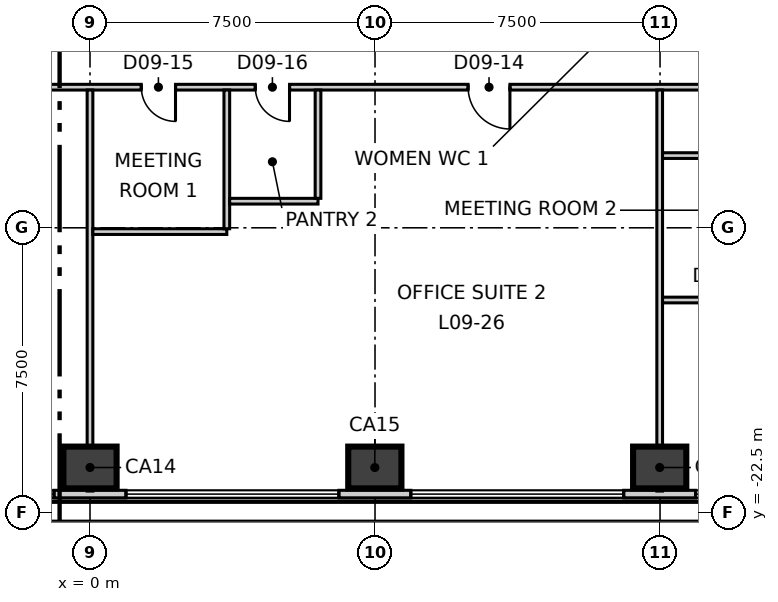
"""IFC4 building model, lengths in metres.
Left out: names, types, materials, properties, quantities, classifications, styles, units other than length and angle.
Written with IfcOpenShell. Run it as: python <this file> out.ifc"""

import sys

from ifc_helpers import new_model, si_unit, direction, frame, frame_2d, origin, origin_2d, place, context, subcontext, project, spatial, rectangle, extrude, element, fill, save


model = new_model("IFC4")
c1 = context("Model", 3, precision=1e-05, world=origin(), true_north=direction((0.0, 1.0)))
c2 = subcontext(c1, "Body", "Model", "MODEL_VIEW")
j1 = project(units=[si_unit("LENGTHUNIT", "METRE"), si_unit("PLANEANGLEUNIT", "RADIAN")], contexts=[c1])
p1 = place(None, origin())
s1 = spatial("IfcSite", under=j1, at=p1, CompositionType="ELEMENT")
p2 = place(p1, origin())
s2 = spatial("IfcBuilding", under=s1, at=p2, CompositionType="ELEMENT")
p3 = place(p2, frame((0.0, 0.0, 47.3)))
s3 = spatial("IfcBuildingStorey", under=s2, at=p3, CompositionType="ELEMENT", Elevation=47.3)
for number, where, z_axis, x_axis in (
    (1, (0.0, -21.307, -0.3), (0.0, 0.0, 1.0), (1.0, 0.0, 0.0)),
    (2, (7.495, -21.307, -0.3), (0.0, 0.0, 1.0), (1.0, 0.0, 0.0)),
    (3, (14.991, -21.307, -0.3), (0.0, 0.0, 1.0), (1.0, 0.0, 0.0)),
):
    element("IfcColumn", number, at=place(p3, frame(where, z_axis=z_axis, x_axis=x_axis)), inside=s3, PredefinedType="COLUMN", context=c2, shape_type="SweptSolid", body=[
        extrude(rectangle(XDim=1.4, YDim=1.1, at=origin_2d()), origin(), (0.0, 0.0, 1.0), 4.0),
    ])
p4 = place(p3, frame((-31.284, -22.007, 0.0), z_axis=(0.0, 0.0, 1.0), x_axis=(1.0, 0.0, 0.0)))
e4 = element("IfcWall", 4, at=p4, inside=s3, PredefinedType="ELEMENTEDWALL", context=c2, shape_type="SweptSolid", body=[
    extrude(rectangle(XDim=62.548, YDim=0.2, at=frame_2d((31.274, 0.0))), origin(), (0.0, 0.0, 1.0), 3.7),
])
p5 = place(p4, frame((2.251, 0.0, 0.9)))
e5 = element("IfcOpeningElement", 5, at=p5, cuts=e4, PredefinedType="OPENING", context=c2, shape_type="SweptSolid", body=[
    extrude(rectangle(XDim=5.6, YDim=2.5, at=frame_2d((2.8, 1.25))), frame((0.0, 0.11, 0.0), z_axis=(0.0, -1.0, 0.0), x_axis=(1.0, 0.0, 0.0)), (0.0, 0.0, 1.0), 0.22),
])
p6 = place(p4, frame((9.746, 0.0, 0.9)))
e6 = element("IfcOpeningElement", 6, at=p6, cuts=e4, PredefinedType="OPENING", context=c2, shape_type="SweptSolid", body=[
    extrude(rectangle(XDim=5.6, YDim=2.5, at=frame_2d((2.8, 1.25))), frame((0.0, 0.11, 0.0), z_axis=(0.0, -1.0, 0.0), x_axis=(1.0, 0.0, 0.0)), (0.0, 0.0, 1.0), 0.22),
])
p7 = place(p4, frame((17.241, 0.0, 0.9)))
e7 = element("IfcOpeningElement", 7, at=p7, cuts=e4, PredefinedType="OPENING", context=c2, shape_type="SweptSolid", body=[
    extrude(rectangle(XDim=5.6, YDim=2.5, at=frame_2d((2.8, 1.25))), frame((0.0, 0.11, 0.0), z_axis=(0.0, -1.0, 0.0), x_axis=(1.0, 0.0, 0.0)), (0.0, 0.0, 1.0), 0.22),
])
p8 = place(p4, frame((24.736, 0.0, 0.9)))
e8 = element("IfcOpeningElement", 8, at=p8, cuts=e4, PredefinedType="OPENING", context=c2, shape_type="SweptSolid", body=[
    extrude(rectangle(XDim=5.6, YDim=2.5, at=frame_2d((2.8, 1.25))), frame((0.0, 0.11, 0.0), z_axis=(0.0, -1.0, 0.0), x_axis=(1.0, 0.0, 0.0)), (0.0, 0.0, 1.0), 0.22),
])
p9 = place(p4, frame((32.232, 0.0, 0.9)))
e9 = element("IfcOpeningElement", 9, at=p9, cuts=e4, PredefinedType="OPENING", context=c2, shape_type="SweptSolid", body=[
    extrude(rectangle(XDim=5.6, YDim=2.5, at=frame_2d((2.8, 1.25))), frame((0.0, 0.11, 0.0), z_axis=(0.0, -1.0, 0.0), x_axis=(1.0, 0.0, 0.0)), (0.0, 0.0, 1.0), 0.22),
])
p10 = place(p4, frame((39.727, 0.0, 0.9)))
e10 = element("IfcOpeningElement", 10, at=p10, cuts=e4, PredefinedType="OPENING", context=c2, shape_type="SweptSolid", body=[
    extrude(rectangle(XDim=5.6, YDim=2.5, at=frame_2d((2.8, 1.25))), frame((0.0, 0.11, 0.0), z_axis=(0.0, -1.0, 0.0), x_axis=(1.0, 0.0, 0.0)), (0.0, 0.0, 1.0), 0.22),
])
p11 = place(p4, frame((47.222, 0.0, 0.9)))
e11 = element("IfcOpeningElement", 11, at=p11, cuts=e4, PredefinedType="OPENING", context=c2, shape_type="SweptSolid", body=[
    extrude(rectangle(XDim=5.6, YDim=2.5, at=frame_2d((2.8, 1.25))), frame((0.0, 0.11, 0.0), z_axis=(0.0, -1.0, 0.0), x_axis=(1.0, 0.0, 0.0)), (0.0, 0.0, 1.0), 0.22),
])
p12 = place(p4, frame((54.717, 0.0, 0.9)))
e12 = element("IfcOpeningElement", 12, at=p12, cuts=e4, PredefinedType="OPENING", context=c2, shape_type="SweptSolid", body=[
    extrude(rectangle(XDim=5.6, YDim=2.5, at=frame_2d((2.8, 1.25))), frame((0.0, 0.11, 0.0), z_axis=(0.0, -1.0, 0.0), x_axis=(1.0, 0.0, 0.0)), (0.0, 0.0, 1.0), 0.22),
])
p13 = place(p3, frame((34.701, -16.089, 0.0), z_axis=(0.0, 0.0, 1.0), x_axis=(-0.499998722828, 0.866026141159, 0.0)))
e13 = element("IfcWall", 13, at=p13, inside=s3, PredefinedType="ELEMENTEDWALL", context=c2, shape_type="SweptSolid", body=[
    extrude(rectangle(XDim=62.548, YDim=0.2, at=frame_2d((31.274, 0.0))), origin(), (0.0, 0.0, 1.0), 3.7),
])
p14 = place(p13, frame((2.25, 0.0, 0.9)))
e14 = element("IfcOpeningElement", 14, at=p14, cuts=e13, PredefinedType="OPENING", context=c2, shape_type="SweptSolid", body=[
    extrude(rectangle(XDim=5.6, YDim=2.5, at=frame_2d((2.8, 1.25))), frame((0.0, 0.11, 0.0), z_axis=(0.0, -1.0, 0.0), x_axis=(1.0, 0.0, 0.0)), (0.0, 0.0, 1.0), 0.22),
])
p15 = place(p13, frame((9.746, 0.0, 0.9)))
e15 = element("IfcOpeningElement", 15, at=p15, cuts=e13, PredefinedType="OPENING", context=c2, shape_type="SweptSolid", body=[
    extrude(rectangle(XDim=5.6, YDim=2.5, at=frame_2d((2.8, 1.25))), frame((0.0, 0.11, 0.0), z_axis=(0.0, -1.0, 0.0), x_axis=(1.0, 0.0, 0.0)), (0.0, 0.0, 1.0), 0.22),
])
p16 = place(p13, frame((17.241, 0.0, 0.9)))
e16 = element("IfcOpeningElement", 16, at=p16, cuts=e13, PredefinedType="OPENING", context=c2, shape_type="SweptSolid", body=[
    extrude(rectangle(XDim=5.6, YDim=2.5, at=frame_2d((2.8, 1.25))), frame((0.0, 0.11, 0.0), z_axis=(0.0, -1.0, 0.0), x_axis=(1.0, 0.0, 0.0)), (0.0, 0.0, 1.0), 0.22),
])
p17 = place(p13, frame((24.736, 0.0, 0.9)))
e17 = element("IfcOpeningElement", 17, at=p17, cuts=e13, PredefinedType="OPENING", context=c2, shape_type="SweptSolid", body=[
    extrude(rectangle(XDim=5.6, YDim=2.5, at=frame_2d((2.8, 1.25))), frame((0.0, 0.11, 0.0), z_axis=(0.0, -1.0, 0.0), x_axis=(1.0, 0.0, 0.0)), (0.0, 0.0, 1.0), 0.22),
])
p18 = place(p13, frame((32.232, 0.0, 0.9)))
e18 = element("IfcOpeningElement", 18, at=p18, cuts=e13, PredefinedType="OPENING", context=c2, shape_type="SweptSolid", body=[
    extrude(rectangle(XDim=5.6, YDim=2.5, at=frame_2d((2.8, 1.25))), frame((0.0, 0.11, 0.0), z_axis=(0.0, -1.0, 0.0), x_axis=(1.0, 0.0, 0.0)), (0.0, 0.0, 1.0), 0.22),
])
p19 = place(p13, frame((39.727, 0.0, 0.9)))
e19 = element("IfcOpeningElement", 19, at=p19, cuts=e13, PredefinedType="OPENING", context=c2, shape_type="SweptSolid", body=[
    extrude(rectangle(XDim=5.6, YDim=2.5, at=frame_2d((2.8, 1.25))), frame((0.0, 0.11, 0.0), z_axis=(0.0, -1.0, 0.0), x_axis=(1.0, 0.0, 0.0)), (0.0, 0.0, 1.0), 0.22),
])
p20 = place(p13, frame((47.222, 0.0, 0.9)))
e20 = element("IfcOpeningElement", 20, at=p20, cuts=e13, PredefinedType="OPENING", context=c2, shape_type="SweptSolid", body=[
    extrude(rectangle(XDim=5.6, YDim=2.5, at=frame_2d((2.8, 1.25))), frame((0.0, 0.11, 0.0), z_axis=(0.0, -1.0, 0.0), x_axis=(1.0, 0.0, 0.0)), (0.0, 0.0, 1.0), 0.22),
])
p21 = place(p13, frame((54.717, 0.0, 0.9)))
e21 = element("IfcOpeningElement", 21, at=p21, cuts=e13, PredefinedType="OPENING", context=c2, shape_type="SweptSolid", body=[
    extrude(rectangle(XDim=5.6, YDim=2.5, at=frame_2d((2.8, 1.25))), frame((0.0, 0.11, 0.0), z_axis=(0.0, -1.0, 0.0), x_axis=(1.0, 0.0, 0.0)), (0.0, 0.0, 1.0), 0.22),
])
p22 = place(p3, frame((-19.497, -11.17, 0.0), z_axis=(0.0, 0.0, 1.0), x_axis=(0.499998854553, 0.866026065108, 0.0)))
e22 = element("IfcWall", 22, at=p22, inside=s3, PredefinedType="PARTITIONING", context=c2, shape_type="SweptSolid", body=[
    extrude(rectangle(XDim=38.994, YDim=0.15, at=frame_2d((19.497, 0.0))), origin(), (0.0, 0.0, 1.0), 3.7),
])
p23 = place(p22, frame((36.144, 0.0, 0.0)))
e23 = element("IfcOpeningElement", 23, at=p23, cuts=e22, PredefinedType="OPENING", context=c2, shape_type="SweptSolid", body=[
    extrude(rectangle(XDim=1.1, YDim=2.1, at=frame_2d((0.55, 1.05))), frame((0.0, 0.085, 0.0), z_axis=(0.0, -1.0, 0.0), x_axis=(1.0, 0.0, 0.0)), (0.0, 0.0, 1.0), 0.17),
])
p24 = place(p22, frame((21.963, 0.0, 0.0)))
e24 = element("IfcOpeningElement", 24, at=p24, cuts=e22, PredefinedType="OPENING", context=c2, shape_type="SweptSolid", body=[
    extrude(rectangle(XDim=1.1, YDim=2.1, at=frame_2d((0.55, 1.05))), frame((0.0, 0.085, 0.0), z_axis=(0.0, -1.0, 0.0), x_axis=(1.0, 0.0, 0.0)), (0.0, 0.0, 1.0), 0.17),
])
p25 = place(p22, frame((32.363, 0.0, 0.0)))
e25 = element("IfcOpeningElement", 25, at=p25, cuts=e22, PredefinedType="OPENING", context=c2, shape_type="SweptSolid", body=[
    extrude(rectangle(XDim=0.9, YDim=2.1, at=frame_2d((0.45, 1.05))), frame((0.0, 0.085, 0.0), z_axis=(0.0, -1.0, 0.0), x_axis=(1.0, 0.0, 0.0)), (0.0, 0.0, 1.0), 0.17),
])
p26 = place(p22, frame((29.163, 0.0, 0.0)))
e26 = element("IfcOpeningElement", 26, at=p26, cuts=e22, PredefinedType="OPENING", context=c2, shape_type="SweptSolid", body=[
    extrude(rectangle(XDim=0.9, YDim=2.1, at=frame_2d((0.45, 1.05))), frame((0.0, 0.085, 0.0), z_axis=(0.0, -1.0, 0.0), x_axis=(1.0, 0.0, 0.0)), (0.0, 0.0, 1.0), 0.17),
])
p27 = place(p22, frame((26.263, 0.0, 0.0)))
e27 = element("IfcOpeningElement", 27, at=p27, cuts=e22, PredefinedType="OPENING", context=c2, shape_type="SweptSolid", body=[
    extrude(rectangle(XDim=1.0, YDim=2.1, at=frame_2d((0.5, 1.05))), frame((0.0, 0.085, 0.0), z_axis=(0.0, -1.0, 0.0), x_axis=(1.0, 0.0, 0.0)), (0.0, 0.0, 1.0), 0.17),
])
p28 = place(p22, frame((11.373, 0.0, 0.0)))
e28 = element("IfcOpeningElement", 28, at=p28, cuts=e22, PredefinedType="OPENING", context=c2, shape_type="SweptSolid", body=[
    extrude(rectangle(XDim=1.1, YDim=2.1, at=frame_2d((0.55, 1.05))), frame((0.0, 0.085, 0.0), z_axis=(0.0, -1.0, 0.0), x_axis=(1.0, 0.0, 0.0)), (0.0, 0.0, 1.0), 0.17),
])
p29 = place(p22, frame((1.581, 0.0, 0.0)))
e29 = element("IfcOpeningElement", 29, at=p29, cuts=e22, PredefinedType="OPENING", context=c2, shape_type="SweptSolid", body=[
    extrude(rectangle(XDim=1.1, YDim=2.1, at=frame_2d((0.55, 1.05))), frame((0.0, 0.085, 0.0), z_axis=(0.0, -1.0, 0.0), x_axis=(1.0, 0.0, 0.0)), (0.0, 0.0, 1.0), 0.17),
])
p30 = place(p3, frame((-19.422, -11.3, 0.0), z_axis=(0.0, 0.0, 1.0), x_axis=(1.0, 0.0, 0.0)))
e30 = element("IfcWall", 30, at=p30, inside=s3, PredefinedType="PARTITIONING", context=c2, shape_type="SweptSolid", body=[
    extrude(rectangle(XDim=38.994, YDim=0.15, at=frame_2d((19.497, 0.0))), origin(), (0.0, 0.0, 1.0), 3.7),
])
p31 = place(p30, frame((1.6, 0.0, 0.0)))
e31 = element("IfcOpeningElement", 31, at=p31, cuts=e30, PredefinedType="OPENING", context=c2, shape_type="SweptSolid", body=[
    extrude(rectangle(XDim=1.1, YDim=2.1, at=frame_2d((0.55, 1.05))), frame((0.0, 0.085, 0.0), z_axis=(0.0, -1.0, 0.0), x_axis=(1.0, 0.0, 0.0)), (0.0, 0.0, 1.0), 0.17),
])
p32 = place(p30, frame((7.682, 0.0, 0.0)))
e32 = element("IfcOpeningElement", 32, at=p32, cuts=e30, PredefinedType="OPENING", context=c2, shape_type="SweptSolid", body=[
    extrude(rectangle(XDim=1.0, YDim=2.1, at=frame_2d((0.5, 1.05))), frame((0.0, 0.085, 0.0), z_axis=(0.0, -1.0, 0.0), x_axis=(1.0, 0.0, 0.0)), (0.0, 0.0, 1.0), 0.17),
])
p33 = place(p30, frame((15.177, 0.0, 0.0)))
e33 = element("IfcOpeningElement", 33, at=p33, cuts=e30, PredefinedType="OPENING", context=c2, shape_type="SweptSolid", body=[
    extrude(rectangle(XDim=1.0, YDim=2.1, at=frame_2d((0.5, 1.05))), frame((0.0, 0.085, 0.0), z_axis=(0.0, -1.0, 0.0), x_axis=(1.0, 0.0, 0.0)), (0.0, 0.0, 1.0), 0.17),
])
p34 = place(p30, frame((29.372, 0.0, 0.0)))
e34 = element("IfcOpeningElement", 34, at=p34, cuts=e30, PredefinedType="OPENING", context=c2, shape_type="SweptSolid", body=[
    extrude(rectangle(XDim=1.1, YDim=2.1, at=frame_2d((0.55, 1.05))), frame((0.0, 0.085, 0.0), z_axis=(0.0, -1.0, 0.0), x_axis=(1.0, 0.0, 0.0)), (0.0, 0.0, 1.0), 0.17),
])
p35 = place(p30, frame((20.772, 0.0, 0.0)))
e35 = element("IfcOpeningElement", 35, at=p35, cuts=e30, PredefinedType="OPENING", context=c2, shape_type="SweptSolid", body=[
    extrude(rectangle(XDim=0.9, YDim=2.1, at=frame_2d((0.45, 1.05))), frame((0.0, 0.085, 0.0), z_axis=(0.0, -1.0, 0.0), x_axis=(1.0, 0.0, 0.0)), (0.0, 0.0, 1.0), 0.17),
])
p36 = place(p30, frame((23.772, 0.0, 0.0)))
e36 = element("IfcOpeningElement", 36, at=p36, cuts=e30, PredefinedType="OPENING", context=c2, shape_type="SweptSolid", body=[
    extrude(rectangle(XDim=0.9, YDim=2.1, at=frame_2d((0.45, 1.05))), frame((0.0, 0.085, 0.0), z_axis=(0.0, -1.0, 0.0), x_axis=(1.0, 0.0, 0.0)), (0.0, 0.0, 1.0), 0.17),
])
p37 = place(p30, frame((36.163, 0.0, 0.0)))
e37 = element("IfcOpeningElement", 37, at=p37, cuts=e30, PredefinedType="OPENING", context=c2, shape_type="SweptSolid", body=[
    extrude(rectangle(XDim=1.1, YDim=2.1, at=frame_2d((0.55, 1.05))), frame((0.0, 0.085, 0.0), z_axis=(0.0, -1.0, 0.0), x_axis=(1.0, 0.0, 0.0)), (0.0, 0.0, 1.0), 0.17),
])
p38 = place(p3, frame((0.0, -21.927, 0.0), z_axis=(0.0, 0.0, 1.0), x_axis=(0.0, 1.0, 0.0)))
e38 = element("IfcWall", 38, at=p38, inside=s3, PredefinedType="PARTITIONING", context=c2, shape_type="SweptSolid", body=[
    extrude(rectangle(XDim=10.552, YDim=0.15, at=frame_2d((5.276, 0.0))), origin(), (0.0, 0.0, 1.0), 3.2),
])
p39 = place(p3, frame((0.075, -15.1, 0.0), z_axis=(0.0, 0.0, 1.0), x_axis=(1.0, 0.0, 0.0)))
e39 = element("IfcWall", 39, at=p39, inside=s3, PredefinedType="PARTITIONING", context=c2, shape_type="SweptSolid", body=[
    extrude(rectangle(XDim=3.525, YDim=0.15, at=frame_2d((1.763, 0.0))), origin(), (0.0, 0.0, 1.0), 3.7),
])
p40 = place(p3, frame((3.6, -15.025, 0.0), z_axis=(0.0, 0.0, 1.0), x_axis=(0.0, 1.0, 0.0)))
e40 = element("IfcWall", 40, at=p40, inside=s3, PredefinedType="PARTITIONING", context=c2, shape_type="SweptSolid", body=[
    extrude(rectangle(XDim=3.65, YDim=0.15, at=frame_2d((1.825, 0.0))), origin(), (0.0, 0.0, 1.0), 3.7),
])
p41 = place(p3, frame((0.075, 22.47, 0.0), z_axis=(0.0, 0.0, 1.0), x_axis=(0.500002280369, -0.866024087209, 0.0)))
e41 = element("IfcWall", 41, at=p41, inside=s3, PredefinedType="PARTITIONING", context=c2, shape_type="SweptSolid", body=[
    extrude(rectangle(XDim=38.844, YDim=0.15, at=frame_2d((19.422, 0.0))), origin(), (0.0, 0.0, 1.0), 3.7),
])
p42 = place(p41, frame((36.244, 0.0, 0.0)))
e42 = element("IfcOpeningElement", 42, at=p42, cuts=e41, PredefinedType="OPENING", context=c2, shape_type="SweptSolid", body=[
    extrude(rectangle(XDim=1.0, YDim=2.1, at=frame_2d((0.5, 1.05))), frame((0.0, 0.085, 0.0), z_axis=(0.0, -1.0, 0.0), x_axis=(1.0, 0.0, 0.0)), (0.0, 0.0, 1.0), 0.17),
])
p43 = place(p41, frame((21.963, 0.0, 0.0)))
e43 = element("IfcOpeningElement", 43, at=p43, cuts=e41, PredefinedType="OPENING", context=c2, shape_type="SweptSolid", body=[
    extrude(rectangle(XDim=1.1, YDim=2.1, at=frame_2d((0.55, 1.05))), frame((0.0, 0.085, 0.0), z_axis=(0.0, -1.0, 0.0), x_axis=(1.0, 0.0, 0.0)), (0.0, 0.0, 1.0), 0.17),
])
p44 = place(p41, frame((32.363, 0.0, 0.0)))
e44 = element("IfcOpeningElement", 44, at=p44, cuts=e41, PredefinedType="OPENING", context=c2, shape_type="SweptSolid", body=[
    extrude(rectangle(XDim=0.9, YDim=2.1, at=frame_2d((0.45, 1.05))), frame((0.0, 0.085, 0.0), z_axis=(0.0, -1.0, 0.0), x_axis=(1.0, 0.0, 0.0)), (0.0, 0.0, 1.0), 0.17),
])
p45 = place(p41, frame((29.163, 0.0, 0.0)))
e45 = element("IfcOpeningElement", 45, at=p45, cuts=e41, PredefinedType="OPENING", context=c2, shape_type="SweptSolid", body=[
    extrude(rectangle(XDim=0.9, YDim=2.1, at=frame_2d((0.45, 1.05))), frame((0.0, 0.085, 0.0), z_axis=(0.0, -1.0, 0.0), x_axis=(1.0, 0.0, 0.0)), (0.0, 0.0, 1.0), 0.17),
])
p46 = place(p41, frame((26.263, 0.0, 0.0)))
e46 = element("IfcOpeningElement", 46, at=p46, cuts=e41, PredefinedType="OPENING", context=c2, shape_type="SweptSolid", body=[
    extrude(rectangle(XDim=1.0, YDim=2.1, at=frame_2d((0.5, 1.05))), frame((0.0, 0.085, 0.0), z_axis=(0.0, -1.0, 0.0), x_axis=(1.0, 0.0, 0.0)), (0.0, 0.0, 1.0), 0.17),
])
p47 = place(p41, frame((9.071, 0.0, 0.0)))
e47 = element("IfcOpeningElement", 47, at=p47, cuts=e41, PredefinedType="OPENING", context=c2, shape_type="SweptSolid", body=[
    extrude(rectangle(XDim=1.1, YDim=2.1, at=frame_2d((0.55, 1.05))), frame((0.0, 0.085, 0.0), z_axis=(0.0, -1.0, 0.0), x_axis=(1.0, 0.0, 0.0)), (0.0, 0.0, 1.0), 0.17),
])
p48 = place(p3, frame((3.675, -14.3, 0.0), z_axis=(0.0, 0.0, 1.0), x_axis=(1.0, 0.0, 0.0)))
e48 = element("IfcWall", 48, at=p48, inside=s3, PredefinedType="PARTITIONING", context=c2, shape_type="SweptSolid", body=[
    extrude(rectangle(XDim=2.325, YDim=0.15, at=frame_2d((1.163, 0.0))), origin(), (0.0, 0.0, 1.0), 3.7),
])
p49 = place(p3, frame((6.0, -14.225, 0.0), z_axis=(0.0, 0.0, 1.0), x_axis=(0.0, 1.0, 0.0)))
e49 = element("IfcWall", 49, at=p49, inside=s3, PredefinedType="PARTITIONING", context=c2, shape_type="SweptSolid", body=[
    extrude(rectangle(XDim=2.85, YDim=0.15, at=frame_2d((1.425, 0.0))), origin(), (0.0, 0.0, 1.0), 3.7),
])
p50 = place(p3, frame((14.991, -21.927, 0.0), z_axis=(0.0, 0.0, 1.0), x_axis=(0.0, 1.0, 0.0)))
e50 = element("IfcWall", 50, at=p50, inside=s3, PredefinedType="PARTITIONING", context=c2, shape_type="SweptSolid", body=[
    extrude(rectangle(XDim=10.552, YDim=0.15, at=frame_2d((5.276, 0.0))), origin(), (0.0, 0.0, 1.0), 3.7),
])
p51 = place(p3, frame((15.066, -16.9, 0.0), z_axis=(0.0, 0.0, 1.0), x_axis=(1.0, 0.0, 0.0)))
e51 = element("IfcWall", 51, at=p51, inside=s3, PredefinedType="PARTITIONING", context=c2, shape_type="SweptSolid", body=[
    extrude(rectangle(XDim=3.525, YDim=0.15, at=frame_2d((1.763, 0.0))), origin(), (0.0, 0.0, 1.0), 3.7),
])
p52 = place(p51, frame((1.275, 0.0, 0.0)))
e52 = element("IfcOpeningElement", 52, at=p52, cuts=e51, PredefinedType="OPENING", context=c2, shape_type="SweptSolid", body=[
    extrude(rectangle(XDim=0.9, YDim=2.1, at=frame_2d((0.45, 1.05))), frame((0.0, 0.085, 0.0), z_axis=(0.0, -1.0, 0.0), x_axis=(1.0, 0.0, 0.0)), (0.0, 0.0, 1.0), 0.17),
])
p53 = place(p3, frame((15.066, -13.1, 0.0), z_axis=(0.0, 0.0, 1.0), x_axis=(1.0, 0.0, 0.0)))
e53 = element("IfcWall", 53, at=p53, inside=s3, PredefinedType="PARTITIONING", context=c2, shape_type="SweptSolid", body=[
    extrude(rectangle(XDim=5.725, YDim=0.15, at=frame_2d((2.863, 0.0))), origin(), (0.0, 0.0, 1.0), 3.7),
])
p54 = place(p8, origin())
e54 = element("IfcWindow", 54, at=p54, inside=s3, PartitioningType="SINGLE_PANEL", PredefinedType="WINDOW", context=c2, shape_type="SweptSolid", body=[
    extrude(rectangle(XDim=5.6, YDim=2.5, at=frame_2d((2.8, 1.25))), frame((0.0, 0.03, 0.0), z_axis=(0.0, -1.0, 0.0), x_axis=(1.0, 0.0, 0.0)), (0.0, 0.0, 1.0), 0.06),
])
fill(e8, e54)
p55 = place(p9, origin())
e55 = element("IfcWindow", 55, at=p55, inside=s3, PartitioningType="SINGLE_PANEL", PredefinedType="WINDOW", context=c2, shape_type="SweptSolid", body=[
    extrude(rectangle(XDim=5.6, YDim=2.5, at=frame_2d((2.8, 1.25))), frame((0.0, 0.03, 0.0), z_axis=(0.0, -1.0, 0.0), x_axis=(1.0, 0.0, 0.0)), (0.0, 0.0, 1.0), 0.06),
])
fill(e9, e55)
p56 = place(p10, origin())
e56 = element("IfcWindow", 56, at=p56, inside=s3, PartitioningType="SINGLE_PANEL", PredefinedType="WINDOW", context=c2, shape_type="SweptSolid", body=[
    extrude(rectangle(XDim=5.6, YDim=2.5, at=frame_2d((2.8, 1.25))), frame((0.0, 0.03, 0.0), z_axis=(0.0, -1.0, 0.0), x_axis=(1.0, 0.0, 0.0)), (0.0, 0.0, 1.0), 0.06),
])
fill(e10, e56)
p57 = place(p11, origin())
e57 = element("IfcWindow", 57, at=p57, inside=s3, PartitioningType="SINGLE_PANEL", PredefinedType="WINDOW", context=c2, shape_type="SweptSolid", body=[
    extrude(rectangle(XDim=5.6, YDim=2.5, at=frame_2d((2.8, 1.25))), frame((0.0, 0.03, 0.0), z_axis=(0.0, -1.0, 0.0), x_axis=(1.0, 0.0, 0.0)), (0.0, 0.0, 1.0), 0.06),
])
fill(e11, e57)
p58 = place(p34, origin())
e58 = element("IfcDoor", 58, at=p58, inside=s3, OperationType="SINGLE_SWING_RIGHT", PredefinedType="DOOR", context=c2, shape_type="SweptSolid", body=[
    extrude(rectangle(XDim=1.1, YDim=2.1, at=frame_2d((0.55, 1.05))), frame((0.0, 0.025, 0.0), z_axis=(0.0, -1.0, 0.0), x_axis=(1.0, 0.0, 0.0)), (0.0, 0.0, 1.0), 0.05),
])
fill(e34, e58)
p59 = place(p35, origin())
e59 = element("IfcDoor", 59, at=p59, inside=s3, OperationType="SINGLE_SWING_RIGHT", PredefinedType="DOOR", context=c2, shape_type="SweptSolid", body=[
    extrude(rectangle(XDim=0.9, YDim=2.1, at=frame_2d((0.45, 1.05))), frame((0.0, 0.025, 0.0), z_axis=(0.0, -1.0, 0.0), x_axis=(1.0, 0.0, 0.0)), (0.0, 0.0, 1.0), 0.05),
])
fill(e35, e59)
p60 = place(p36, origin())
e60 = element("IfcDoor", 60, at=p60, inside=s3, OperationType="SINGLE_SWING_RIGHT", PredefinedType="DOOR", context=c2, shape_type="SweptSolid", body=[
    extrude(rectangle(XDim=0.9, YDim=2.1, at=frame_2d((0.45, 1.05))), frame((0.0, 0.025, 0.0), z_axis=(0.0, -1.0, 0.0), x_axis=(1.0, 0.0, 0.0)), (0.0, 0.0, 1.0), 0.05),
])
fill(e36, e60)
save(model, sys.argv[1])
